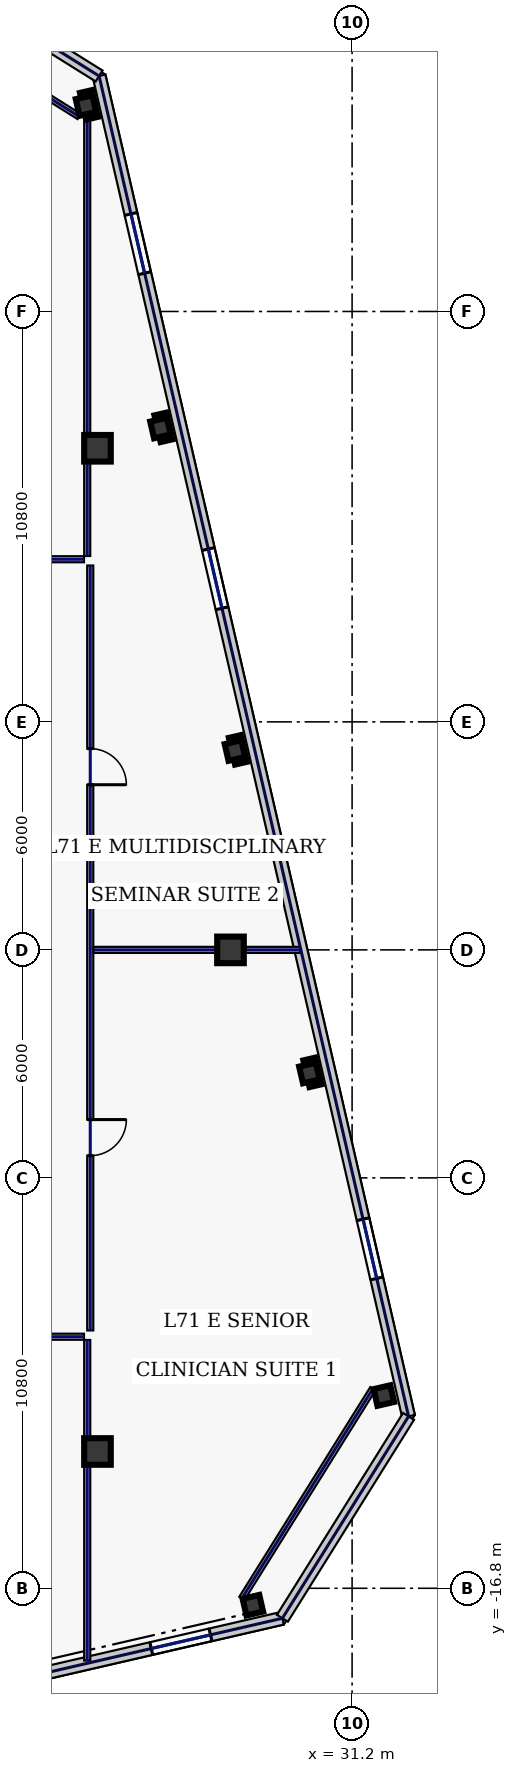
"""IFC4 building model, lengths in metres.
Left out: names, types, materials, properties, quantities, classifications, styles, units other than length and angle.
Written with IfcOpenShell. Run it as: python <this file> out.ifc"""

import sys

from ifc_helpers import new_model, si_unit, direction, frame, frame_2d, origin, origin_2d, place, context, subcontext, project, spatial, rectangle, hollow_rectangle, extrude, element, fill, save


model = new_model("IFC4")
c1 = context("Model", 3, precision=1e-05, world=origin(), true_north=direction((0.0, 1.0)))
c2 = subcontext(c1, "Body", "Model", "MODEL_VIEW")
j1 = project(units=[si_unit("LENGTHUNIT", "METRE"), si_unit("PLANEANGLEUNIT", "RADIAN")], contexts=[c1])
p1 = place(None, origin())
s1 = spatial("IfcSite", under=j1, at=p1, CompositionType="ELEMENT")
p2 = place(p1, origin())
s2 = spatial("IfcBuilding", under=s1, at=p2, CompositionType="ELEMENT")
p3 = place(p2, frame((0.0, 0.0, 305.0)))
s3 = spatial("IfcBuildingStorey", under=s2, at=p3, CompositionType="ELEMENT", Elevation=305.0)
for number, where, z_axis, x_axis in (
    (1, (24.5, -13.2, 0.0), (0.0, 0.0, 1.0), (1.0, 0.0, 0.0)),
    (2, (24.5, 13.2, 0.0), (0.0, 0.0, 1.0), (1.0, 0.0, 0.0)),
    (3, (28.0, 0.0, 0.0), (0.0, 0.0, 1.0), (1.0, 0.0, 0.0)),
):
    element("IfcColumn", number, at=place(p3, frame(where, z_axis=z_axis, x_axis=x_axis)), inside=s3, PredefinedType="COLUMN", context=c2, shape_type="SweptSolid", body=[
        extrude(hollow_rectangle(XDim=0.7, YDim=0.7, WallThickness=0.032, at=origin_2d()), origin(), (0.0, 0.0, 1.0), 3.74),
    ])
for number, where, z_axis, x_axis in (
    (4, (28.589, -17.245, 0.0), (0.0, 0.0, 1.0), (0.974, 0.225, 0.0)),
    (5, (32.036, -11.728, 0.0), (0.0, 0.0, 1.0), (0.974, 0.225, 0.0)),
    (6, (30.077, -3.241, 0.0), (0.0, 0.0, 1.0), (0.974, 0.225, 0.0)),
    (7, (28.117, 5.246, 0.0), (0.0, 0.0, 1.0), (0.974, 0.225, 0.0)),
    (8, (26.158, 13.732, 0.0), (0.0, 0.0, 1.0), (0.974, 0.225, 0.0)),
    (9, (24.198, 22.219, 0.0), (0.0, 0.0, 1.0), (0.974, 0.225, 0.0)),
):
    element("IfcColumn", number, at=place(p3, frame(where, z_axis=z_axis, x_axis=x_axis)), inside=s3, PredefinedType="COLUMN", context=c2, shape_type="SweptSolid", body=[
        extrude(hollow_rectangle(XDim=0.45, YDim=0.45, WallThickness=0.022, at=origin_2d()), origin(), (0.0, 0.0, 1.0), 3.74),
    ])
p4 = place(p3, frame((12.445, -21.495, 0.0), z_axis=(0.0, 0.0, 1.0), x_axis=(0.974369392164, 0.224953967767, 0.0)))
e10 = element("IfcWall", 10, at=p4, inside=s3, PredefinedType="STANDARD", context=c2, shape_type="SweptSolid", body=[
    extrude(rectangle(XDim=17.366, YDim=0.34, at=frame_2d((8.683, 0.0))), origin(), (0.0, 0.0, 1.0), 3.74),
])
p5 = place(p4, frame((6.19, 0.0, 0.22)))
e11 = element("IfcOpeningElement", 11, at=p5, cuts=e10, PredefinedType="OPENING", context=c2, shape_type="SweptSolid", body=[
    extrude(rectangle(XDim=1.6, YDim=1.2, at=frame_2d((0.8, 0.6))), frame((0.0, 0.18, 0.0), z_axis=(0.0, -1.0, 0.0), x_axis=(1.0, 0.0, 0.0)), (0.0, 0.0, 1.0), 0.36),
])
p6 = place(p4, frame((13.825, 0.0, 0.22)))
e12 = element("IfcOpeningElement", 12, at=p6, cuts=e10, PredefinedType="OPENING", context=c2, shape_type="SweptSolid", body=[
    extrude(rectangle(XDim=1.6, YDim=1.2, at=frame_2d((0.8, 0.6))), frame((0.0, 0.18, 0.0), z_axis=(0.0, -1.0, 0.0), x_axis=(1.0, 0.0, 0.0)), (0.0, 0.0, 1.0), 0.36),
])
p7 = place(p3, frame((32.686, -12.276, 0.0), z_axis=(0.0, 0.0, 1.0), x_axis=(-0.224953091034, 0.974369594576, 0.0)))
e13 = element("IfcWall", 13, at=p7, inside=s3, PredefinedType="STANDARD", context=c2, shape_type="SweptSolid", body=[
    extrude(rectangle(XDim=36.2, YDim=0.34, at=frame_2d((18.1, 0.0))), origin(), (0.0, 0.0, 1.0), 3.74),
])
p8 = place(p7, frame((3.725, 0.0, 0.22)))
e14 = element("IfcOpeningElement", 14, at=p8, cuts=e13, PredefinedType="OPENING", context=c2, shape_type="SweptSolid", body=[
    extrude(rectangle(XDim=1.6, YDim=1.2, at=frame_2d((0.8, 0.6))), frame((0.0, 0.18, 0.0), z_axis=(0.0, -1.0, 0.0), x_axis=(1.0, 0.0, 0.0)), (0.0, 0.0, 1.0), 0.36),
])
p9 = place(p7, frame((21.825, 0.0, 0.22)))
e15 = element("IfcOpeningElement", 15, at=p9, cuts=e13, PredefinedType="OPENING", context=c2, shape_type="SweptSolid", body=[
    extrude(rectangle(XDim=1.6, YDim=1.2, at=frame_2d((0.8, 0.6))), frame((0.0, 0.18, 0.0), z_axis=(0.0, -1.0, 0.0), x_axis=(1.0, 0.0, 0.0)), (0.0, 0.0, 1.0), 0.36),
])
p10 = place(p7, frame((30.875, 0.0, 0.22)))
e16 = element("IfcOpeningElement", 16, at=p10, cuts=e13, PredefinedType="OPENING", context=c2, shape_type="SweptSolid", body=[
    extrude(rectangle(XDim=1.6, YDim=1.2, at=frame_2d((0.8, 0.6))), frame((0.0, 0.18, 0.0), z_axis=(0.0, -1.0, 0.0), x_axis=(1.0, 0.0, 0.0)), (0.0, 0.0, 1.0), 0.36),
])
for number, where, z_axis, x_axis in (
    (17, (29.366, -17.589, 0.0), (0.0, 0.0, 1.0), (0.53, 0.848, 0.0)),
    (18, (24.542, 22.996, 0.0), (0.0, 0.0, 1.0), (-0.848, 0.53, 0.0)),
):
    element("IfcWall", number, at=place(p3, frame(where, z_axis=z_axis, x_axis=x_axis)), inside=s3, PredefinedType="STANDARD", context=c2, shape_type="SweptSolid", body=[
        extrude(rectangle(XDim=6.265, YDim=0.34, at=frame_2d((3.132, 0.0))), origin(), (0.0, 0.0, 1.0), 3.74),
    ])
for number, where, z_axis, x_axis in (
    (19, (28.3, -17.065, 0.0), (0.0, 0.0, 1.0), (0.53, 0.848, 0.0)),
    (20, (24.018, 21.931, 0.0), (0.0, 0.0, 1.0), (-0.848, 0.53, 0.0)),
):
    element("IfcWall", number, at=place(p3, frame(where, z_axis=z_axis, x_axis=x_axis)), inside=s3, PredefinedType="PARTITIONING", context=c2, shape_type="SweptSolid", body=[
        extrude(rectangle(XDim=6.505, YDim=0.16, at=frame_2d((3.253, 0.0))), origin(), (0.0, 0.0, 1.0), 1.535),
    ])
p11 = place(p3, frame((-24.145, 10.28, 0.0), z_axis=(0.0, 0.0, 1.0), x_axis=(1.0, 0.0, 0.0)))
e21 = element("IfcWall", 21, at=p11, inside=s3, PredefinedType="PARTITIONING", context=c2, shape_type="SweptSolid", body=[
    extrude(rectangle(XDim=48.29, YDim=0.16, at=frame_2d((24.145, 0.0))), origin(), (0.0, 0.0, 1.0), 3.74),
])
p12 = place(p11, frame((2.044, 0.0, 0.0)))
e22 = element("IfcOpeningElement", 22, at=p12, cuts=e21, PredefinedType="OPENING", context=c2, shape_type="SweptSolid", body=[
    extrude(rectangle(XDim=0.95, YDim=2.2, at=frame_2d((0.475, 1.1))), frame((0.0, 0.09, 0.0), z_axis=(0.0, -1.0, 0.0), x_axis=(1.0, 0.0, 0.0)), (0.0, 0.0, 1.0), 0.18),
])
p13 = place(p11, frame((6.965, 0.0, 0.0)))
e23 = element("IfcOpeningElement", 23, at=p13, cuts=e21, PredefinedType="OPENING", context=c2, shape_type="SweptSolid", body=[
    extrude(rectangle(XDim=0.95, YDim=2.2, at=frame_2d((0.475, 1.1))), frame((0.0, 0.09, 0.0), z_axis=(0.0, -1.0, 0.0), x_axis=(1.0, 0.0, 0.0)), (0.0, 0.0, 1.0), 0.18),
])
p14 = place(p11, frame((13.58, 0.0, 0.0)))
e24 = element("IfcOpeningElement", 24, at=p14, cuts=e21, PredefinedType="OPENING", context=c2, shape_type="SweptSolid", body=[
    extrude(rectangle(XDim=1.45, YDim=2.2, at=frame_2d((0.725, 1.1))), frame((0.0, 0.09, 0.0), z_axis=(0.0, -1.0, 0.0), x_axis=(1.0, 0.0, 0.0)), (0.0, 0.0, 1.0), 0.18),
])
p15 = place(p11, frame((22.205, 0.0, 0.0)))
e25 = element("IfcOpeningElement", 25, at=p15, cuts=e21, PredefinedType="OPENING", context=c2, shape_type="SweptSolid", body=[
    extrude(rectangle(XDim=1.05, YDim=2.2, at=frame_2d((0.525, 1.1))), frame((0.0, 0.09, 0.0), z_axis=(0.0, -1.0, 0.0), x_axis=(1.0, 0.0, 0.0)), (0.0, 0.0, 1.0), 0.18),
])
p16 = place(p11, frame((31.105, 0.0, 0.0)))
e26 = element("IfcOpeningElement", 26, at=p16, cuts=e21, PredefinedType="OPENING", context=c2, shape_type="SweptSolid", body=[
    extrude(rectangle(XDim=0.95, YDim=2.2, at=frame_2d((0.475, 1.1))), frame((0.0, 0.09, 0.0), z_axis=(0.0, -1.0, 0.0), x_axis=(1.0, 0.0, 0.0)), (0.0, 0.0, 1.0), 0.18),
])
p17 = place(p11, frame((39.27, 0.0, 0.0)))
e27 = element("IfcOpeningElement", 27, at=p17, cuts=e21, PredefinedType="OPENING", context=c2, shape_type="SweptSolid", body=[
    extrude(rectangle(XDim=1.3, YDim=2.2, at=frame_2d((0.65, 1.1))), frame((0.0, 0.09, 0.0), z_axis=(0.0, -1.0, 0.0), x_axis=(1.0, 0.0, 0.0)), (0.0, 0.0, 1.0), 0.18),
])
p18 = place(p11, frame((45.291, 0.0, 0.0)))
e28 = element("IfcOpeningElement", 28, at=p18, cuts=e21, PredefinedType="OPENING", context=c2, shape_type="SweptSolid", body=[
    extrude(rectangle(XDim=1.3, YDim=2.2, at=frame_2d((0.65, 1.1))), frame((0.0, 0.09, 0.0), z_axis=(0.0, -1.0, 0.0), x_axis=(1.0, 0.0, 0.0)), (0.0, 0.0, 1.0), 0.18),
])
p19 = place(p3, frame((24.31, 10.115, 0.0), z_axis=(0.0, 0.0, 1.0), x_axis=(0.0, -1.0, 0.0)))
e29 = element("IfcWall", 29, at=p19, inside=s3, PredefinedType="PARTITIONING", context=c2, shape_type="SweptSolid", body=[
    extrude(rectangle(XDim=20.13, YDim=0.16, at=frame_2d((10.065, 0.0))), origin(), (0.0, 0.0, 1.0), 3.74),
])
p20 = place(p19, frame((14.581, 0.0, 0.0)))
e30 = element("IfcOpeningElement", 30, at=p20, cuts=e29, PredefinedType="OPENING", context=c2, shape_type="SweptSolid", body=[
    extrude(rectangle(XDim=0.95, YDim=2.2, at=frame_2d((0.475, 1.1))), frame((0.0, 0.09, 0.0), z_axis=(0.0, -1.0, 0.0), x_axis=(1.0, 0.0, 0.0)), (0.0, 0.0, 1.0), 0.18),
])
p21 = place(p19, frame((4.819, 0.0, 0.0)))
e31 = element("IfcOpeningElement", 31, at=p21, cuts=e29, PredefinedType="OPENING", context=c2, shape_type="SweptSolid", body=[
    extrude(rectangle(XDim=0.95, YDim=2.2, at=frame_2d((0.475, 1.1))), frame((0.0, 0.09, 0.0), z_axis=(0.0, -1.0, 0.0), x_axis=(1.0, 0.0, 0.0)), (0.0, 0.0, 1.0), 0.18),
])
p22 = place(p3, frame((24.145, -10.18, 0.0), z_axis=(0.0, 0.0, 1.0), x_axis=(-1.0, 0.0, 0.0)))
e32 = element("IfcWall", 32, at=p22, inside=s3, PredefinedType="PARTITIONING", context=c2, shape_type="SweptSolid", body=[
    extrude(rectangle(XDim=36.68, YDim=0.16, at=frame_2d((18.34, 0.0))), origin(), (0.0, 0.0, 1.0), 3.74),
])
p23 = place(p22, frame((32.771, 0.0, 0.0)))
e33 = element("IfcOpeningElement", 33, at=p23, cuts=e32, PredefinedType="OPENING", context=c2, shape_type="SweptSolid", body=[
    extrude(rectangle(XDim=1.15, YDim=2.2, at=frame_2d((0.575, 1.1))), frame((0.0, 0.09, 0.0), z_axis=(0.0, -1.0, 0.0), x_axis=(1.0, 0.0, 0.0)), (0.0, 0.0, 1.0), 0.18),
])
p24 = place(p22, frame((26.48, 0.0, 0.0)))
e34 = element("IfcOpeningElement", 34, at=p24, cuts=e32, PredefinedType="OPENING", context=c2, shape_type="SweptSolid", body=[
    extrude(rectangle(XDim=0.95, YDim=2.2, at=frame_2d((0.475, 1.1))), frame((0.0, 0.09, 0.0), z_axis=(0.0, -1.0, 0.0), x_axis=(1.0, 0.0, 0.0)), (0.0, 0.0, 1.0), 0.18),
])
p25 = place(p22, frame((20.78, 0.0, 0.0)))
e35 = element("IfcOpeningElement", 35, at=p25, cuts=e32, PredefinedType="OPENING", context=c2, shape_type="SweptSolid", body=[
    extrude(rectangle(XDim=0.95, YDim=2.2, at=frame_2d((0.475, 1.1))), frame((0.0, 0.09, 0.0), z_axis=(0.0, -1.0, 0.0), x_axis=(1.0, 0.0, 0.0)), (0.0, 0.0, 1.0), 0.18),
])
p26 = place(p22, frame((12.78, 0.0, 0.0)))
e36 = element("IfcOpeningElement", 36, at=p26, cuts=e32, PredefinedType="OPENING", context=c2, shape_type="SweptSolid", body=[
    extrude(rectangle(XDim=1.3, YDim=2.2, at=frame_2d((0.65, 1.1))), frame((0.0, 0.09, 0.0), z_axis=(0.0, -1.0, 0.0), x_axis=(1.0, 0.0, 0.0)), (0.0, 0.0, 1.0), 0.18),
])
p27 = place(p22, frame((3.659, 0.0, 0.0)))
e37 = element("IfcOpeningElement", 37, at=p27, cuts=e32, PredefinedType="OPENING", context=c2, shape_type="SweptSolid", body=[
    extrude(rectangle(XDim=1.3, YDim=2.2, at=frame_2d((0.65, 1.1))), frame((0.0, 0.09, 0.0), z_axis=(0.0, -1.0, 0.0), x_axis=(1.0, 0.0, 0.0)), (0.0, 0.0, 1.0), 0.18),
])
p28 = place(p3, frame((24.23, 10.365, 0.0), z_axis=(0.0, 0.0, 1.0), x_axis=(0.0, 1.0, 0.0)))
e38 = element("IfcWall", 38, at=p28, inside=s3, PredefinedType="PARTITIONING", context=c2, shape_type="SweptSolid", body=[
    extrude(rectangle(XDim=12.206, YDim=0.16, at=frame_2d((6.103, 0.0))), origin(), (0.0, 0.0, 1.0), 1.535),
])
p29 = place(p3, frame((24.23, -18.703, 0.0), z_axis=(0.0, 0.0, 1.0), x_axis=(0.0, 1.0, 0.0)))
e39 = element("IfcWall", 39, at=p29, inside=s3, PredefinedType="PARTITIONING", context=c2, shape_type="SweptSolid", body=[
    extrude(rectangle(XDim=8.438, YDim=0.16, at=frame_2d((4.219, 0.0))), origin(), (0.0, 0.0, 1.0), 3.74),
])
p30 = place(p3, frame((24.395, 0.0, 0.0), z_axis=(0.0, 0.0, 1.0), x_axis=(1.0, 0.0, 0.0)))
e40 = element("IfcWall", 40, at=p30, inside=s3, PredefinedType="PARTITIONING", context=c2, shape_type="SweptSolid", body=[
    extrude(rectangle(XDim=5.436, YDim=0.16, at=frame_2d((2.718, 0.0))), origin(), (0.0, 0.0, 1.0), 3.74),
])
p31 = place(p6, origin())
e41 = element("IfcWindow", 41, at=p31, inside=s3, PartitioningType="SINGLE_PANEL", PredefinedType="WINDOW", context=c2, shape_type="SweptSolid", body=[
    extrude(rectangle(XDim=1.6, YDim=1.2, at=frame_2d((0.8, 0.6))), frame((0.0, 0.03, 0.0), z_axis=(0.0, -1.0, 0.0), x_axis=(1.0, 0.0, 0.0)), (0.0, 0.0, 1.0), 0.06),
])
fill(e12, e41)
p32 = place(p8, origin())
e42 = element("IfcWindow", 42, at=p32, inside=s3, PartitioningType="SINGLE_PANEL", PredefinedType="WINDOW", context=c2, shape_type="SweptSolid", body=[
    extrude(rectangle(XDim=1.6, YDim=1.2, at=frame_2d((0.8, 0.6))), frame((0.0, 0.03, 0.0), z_axis=(0.0, -1.0, 0.0), x_axis=(1.0, 0.0, 0.0)), (0.0, 0.0, 1.0), 0.06),
])
fill(e14, e42)
p33 = place(p9, origin())
e43 = element("IfcWindow", 43, at=p33, inside=s3, PartitioningType="SINGLE_PANEL", PredefinedType="WINDOW", context=c2, shape_type="SweptSolid", body=[
    extrude(rectangle(XDim=1.6, YDim=1.2, at=frame_2d((0.8, 0.6))), frame((0.0, 0.03, 0.0), z_axis=(0.0, -1.0, 0.0), x_axis=(1.0, 0.0, 0.0)), (0.0, 0.0, 1.0), 0.06),
])
fill(e15, e43)
p34 = place(p10, origin())
e44 = element("IfcWindow", 44, at=p34, inside=s3, PartitioningType="SINGLE_PANEL", PredefinedType="WINDOW", context=c2, shape_type="SweptSolid", body=[
    extrude(rectangle(XDim=1.6, YDim=1.2, at=frame_2d((0.8, 0.6))), frame((0.0, 0.03, 0.0), z_axis=(0.0, -1.0, 0.0), x_axis=(1.0, 0.0, 0.0)), (0.0, 0.0, 1.0), 0.06),
])
fill(e16, e44)
p35 = place(p20, origin())
e45 = element("IfcDoor", 45, at=p35, inside=s3, OperationType="SINGLE_SWING_LEFT", PredefinedType="DOOR", context=c2, shape_type="SweptSolid", body=[
    extrude(rectangle(XDim=0.95, YDim=2.2, at=frame_2d((0.475, 1.1))), frame((0.0, 0.025, 0.0), z_axis=(0.0, -1.0, 0.0), x_axis=(1.0, 0.0, 0.0)), (0.0, 0.0, 1.0), 0.05),
])
fill(e30, e45)
p36 = place(p21, origin())
e46 = element("IfcDoor", 46, at=p36, inside=s3, OperationType="SINGLE_SWING_RIGHT", PredefinedType="DOOR", context=c2, shape_type="SweptSolid", body=[
    extrude(rectangle(XDim=0.95, YDim=2.2, at=frame_2d((0.475, 1.1))), frame((0.0, 0.025, 0.0), z_axis=(0.0, -1.0, 0.0), x_axis=(1.0, 0.0, 0.0)), (0.0, 0.0, 1.0), 0.05),
])
fill(e31, e46)
save(model, sys.argv[1])
